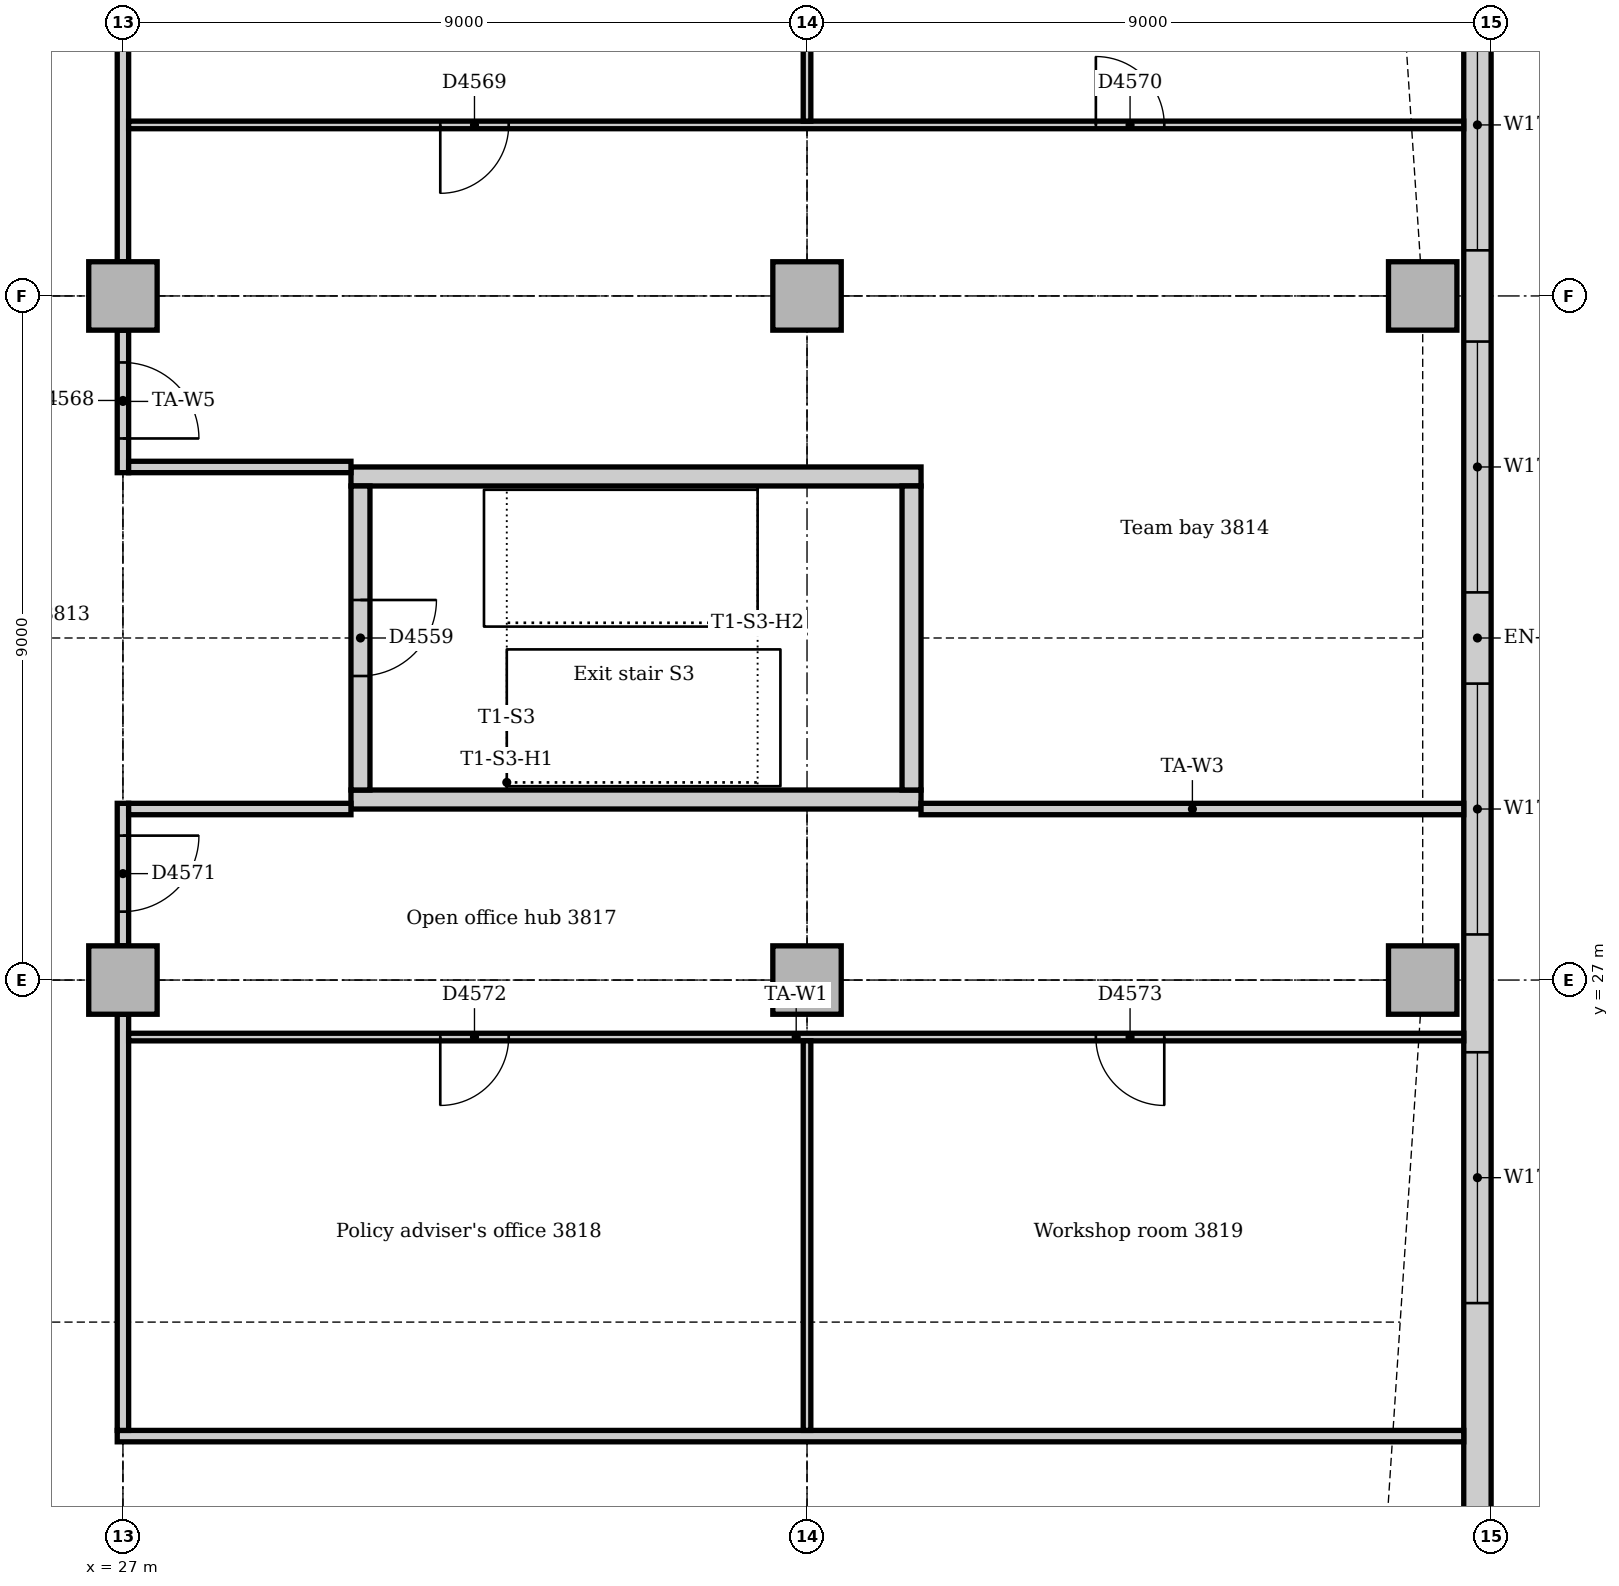
"""IFC4 building model, lengths in metres.
Left out: names, types, materials, properties, quantities, classifications, styles, units other than length and angle.
Written with IfcOpenShell. Run it as: python <this file> out.ifc"""

import sys

from ifc_helpers import new_model, si_unit, direction, frame, frame_2d, origin, origin_2d, place, context, subcontext, project, spatial, rectangle, extrude, element, fill, save


model = new_model("IFC4")
c1 = context("Model", 3, precision=1e-05, world=origin(), true_north=direction((0.0, 1.0)))
c2 = subcontext(c1, "Body", "Model", "MODEL_VIEW")
j1 = project(units=[si_unit("LENGTHUNIT", "METRE"), si_unit("PLANEANGLEUNIT", "RADIAN")], contexts=[c1])
p1 = place(None, origin())
s1 = spatial("IfcSite", under=j1, at=p1, CompositionType="ELEMENT")
p2 = place(p1, origin())
s2 = spatial("IfcBuilding", under=s1, at=p2, CompositionType="ELEMENT")
p3 = place(p2, frame((0.0, 0.0, 161.0)))
s3 = spatial("IfcBuildingStorey", under=s2, at=p3, CompositionType="ELEMENT", Elevation=161.0)
for number, where, z_axis, x_axis in (
    (1, (30.0, 29.375, 0.0), (0.0, 0.0, 1.0), (1.0, 0.0, 0.0)),
    (2, (37.5, 33.625, 0.0), (0.0, 0.0, 1.0), (-1.0, 0.0, 0.0)),
):
    element("IfcWall", number, at=place(p3, frame(where, z_axis=z_axis, x_axis=x_axis)), inside=s3, PredefinedType="SOLIDWALL", context=c2, shape_type="SweptSolid", body=[
        extrude(rectangle(XDim=7.5, YDim=0.25, at=frame_2d((3.75, 0.0))), origin(), (0.0, 0.0, 1.0), 4.0),
    ])
p4 = place(p3, frame((37.375, 29.5, 0.0), z_axis=(0.0, 0.0, 1.0), x_axis=(0.0, 1.0, 0.0)))
e3 = element("IfcWall", 3, at=p4, inside=s3, PredefinedType="SOLIDWALL", context=c2, shape_type="SweptSolid", body=[
    extrude(rectangle(XDim=4.0, YDim=0.25, at=frame_2d((2.0, 0.0))), origin(), (0.0, 0.0, 1.0), 4.0),
])
p5 = place(p3, frame((30.125, 33.5, 0.0), z_axis=(0.0, 0.0, 1.0), x_axis=(0.0, -1.0, 0.0)))
e4 = element("IfcWall", 4, at=p5, inside=s3, PredefinedType="SOLIDWALL", context=c2, shape_type="SweptSolid", body=[
    extrude(rectangle(XDim=4.0, YDim=0.25, at=frame_2d((2.0, 0.0))), origin(), (0.0, 0.0, 1.0), 4.0),
])
p6 = place(p5, frame((1.5, 0.0, 0.0)))
e5 = element("IfcOpeningElement", 5, at=p6, cuts=e4, PredefinedType="OPENING", context=c2, shape_type="SweptSolid", body=[
    extrude(rectangle(XDim=1.0, YDim=2.1, at=frame_2d((0.5, 1.05))), frame((0.0, 0.135, 0.0), z_axis=(0.0, -1.0, 0.0), x_axis=(1.0, 0.0, 0.0)), (0.0, 0.0, 1.0), 0.27),
])
for number, where, z_axis, x_axis in (
    (6, (44.1, 27.0, 0.0), (0.0, 0.0, 1.0), (1.0, 0.0, 0.0)),
    (7, (44.1, 36.0, 0.0), (0.0, 0.0, 1.0), (1.0, 0.0, 0.0)),
    (8, (27.0, 27.0, 0.0), (0.0, 0.0, 1.0), (1.0, 0.0, 0.0)),
    (9, (27.0, 36.0, 0.0), (0.0, 0.0, 1.0), (1.0, 0.0, 0.0)),
    (10, (36.0, 27.0, 0.0), (0.0, 0.0, 1.0), (1.0, 0.0, 0.0)),
    (11, (36.0, 36.0, 0.0), (0.0, 0.0, 1.0), (1.0, 0.0, 0.0)),
):
    element("IfcColumn", number, at=place(p3, frame(where, z_axis=z_axis, x_axis=x_axis)), inside=s3, PredefinedType="COLUMN", context=c2, shape_type="SweptSolid", body=[
        extrude(rectangle(XDim=0.9, YDim=0.9, at=origin_2d()), origin(), (0.0, 0.0, 1.0), 3.85),
    ])
p7 = place(p3, frame((44.82, 19.243, 0.0), z_axis=(0.0, 0.0, 1.0), x_axis=(0.0, 1.0, 0.0)))
e12 = element("IfcWall", 12, at=p7, inside=s3, PredefinedType="STANDARD", context=c2, shape_type="SweptSolid", body=[
    extrude(rectangle(XDim=24.515, YDim=0.36, at=frame_2d((12.257, 0.0))), origin(), (0.0, 0.0, 1.0), 3.85),
])
p8 = place(p7, frame((3.507, 0.0, 0.9)))
e13 = element("IfcOpeningElement", 13, at=p8, cuts=e12, PredefinedType="OPENING", context=c2, shape_type="SweptSolid", body=[
    extrude(rectangle(XDim=3.3, YDim=1.6, at=frame_2d((1.65, 0.8))), frame((0.0, 0.19, 0.0), z_axis=(0.0, -1.0, 0.0), x_axis=(1.0, 0.0, 0.0)), (0.0, 0.0, 1.0), 0.38),
])
p9 = place(p7, frame((8.357, 0.0, 0.9)))
e14 = element("IfcOpeningElement", 14, at=p9, cuts=e12, PredefinedType="OPENING", context=c2, shape_type="SweptSolid", body=[
    extrude(rectangle(XDim=3.3, YDim=1.6, at=frame_2d((1.65, 0.8))), frame((0.0, 0.19, 0.0), z_axis=(0.0, -1.0, 0.0), x_axis=(1.0, 0.0, 0.0)), (0.0, 0.0, 1.0), 0.38),
])
p10 = place(p7, frame((12.857, 0.0, 0.9)))
e15 = element("IfcOpeningElement", 15, at=p10, cuts=e12, PredefinedType="OPENING", context=c2, shape_type="SweptSolid", body=[
    extrude(rectangle(XDim=3.3, YDim=1.6, at=frame_2d((1.65, 0.8))), frame((0.0, 0.19, 0.0), z_axis=(0.0, -1.0, 0.0), x_axis=(1.0, 0.0, 0.0)), (0.0, 0.0, 1.0), 0.38),
])
p11 = place(p7, frame((17.357, 0.0, 0.9)))
e16 = element("IfcOpeningElement", 16, at=p11, cuts=e12, PredefinedType="OPENING", context=c2, shape_type="SweptSolid", body=[
    extrude(rectangle(XDim=3.3, YDim=1.6, at=frame_2d((1.65, 0.8))), frame((0.0, 0.19, 0.0), z_axis=(0.0, -1.0, 0.0), x_axis=(1.0, 0.0, 0.0)), (0.0, 0.0, 1.0), 0.38),
])
p12 = place(p3, frame((26.925, 21.0, 0.0), z_axis=(0.0, 0.0, 1.0), x_axis=(1.0, 0.0, 0.0)))
e17 = element("IfcWall", 17, at=p12, inside=s3, PredefinedType="PARTITIONING", context=c2, shape_type="SweptSolid", body=[
    extrude(rectangle(XDim=17.715, YDim=0.15, at=frame_2d((8.857, 0.0))), origin(), (0.0, 0.0, 1.0), 3.85),
])
p13 = place(p3, frame((27.0, 33.675, 0.0), z_axis=(0.0, 0.0, 1.0), x_axis=(0.0, 1.0, 0.0)))
e18 = element("IfcWall", 18, at=p13, inside=s3, PredefinedType="PARTITIONING", context=c2, shape_type="SweptSolid", body=[
    extrude(rectangle(XDim=1.875, YDim=0.15, at=frame_2d((0.938, 0.0))), origin(), (0.0, 0.0, 1.0), 3.362),
])
p14 = place(p13, frame((0.45, 0.0, 0.0)))
e19 = element("IfcOpeningElement", 19, at=p14, cuts=e18, PredefinedType="OPENING", context=c2, shape_type="SweptSolid", body=[
    extrude(rectangle(XDim=1.0, YDim=2.1, at=frame_2d((0.5, 1.05))), frame((0.0, 0.085, 0.0), z_axis=(0.0, -1.0, 0.0), x_axis=(1.0, 0.0, 0.0)), (0.0, 0.0, 1.0), 0.17),
])
p15 = place(p3, frame((27.0, 36.45, 0.0), z_axis=(0.0, 0.0, 1.0), x_axis=(0.0, 1.0, 0.0)))
e20 = element("IfcWall", 20, at=p15, inside=s3, PredefinedType="PARTITIONING", context=c2, shape_type="SweptSolid", body=[
    extrude(rectangle(XDim=7.2, YDim=0.15, at=frame_2d((3.6, 0.0))), origin(), (0.0, 0.0, 1.0), 3.362),
])
p16 = place(p3, frame((27.0, 21.075, 0.0), z_axis=(0.0, 0.0, 1.0), x_axis=(0.0, 1.0, 0.0)))
e21 = element("IfcWall", 21, at=p16, inside=s3, PredefinedType="PARTITIONING", context=c2, shape_type="SweptSolid", body=[
    extrude(rectangle(XDim=5.475, YDim=0.15, at=frame_2d((2.737, 0.0))), origin(), (0.0, 0.0, 1.0), 3.362),
])
p17 = place(p3, frame((27.0, 27.45, 0.0), z_axis=(0.0, 0.0, 1.0), x_axis=(0.0, 1.0, 0.0)))
e22 = element("IfcWall", 22, at=p17, inside=s3, PredefinedType="PARTITIONING", context=c2, shape_type="SweptSolid", body=[
    extrude(rectangle(XDim=1.875, YDim=0.15, at=frame_2d((0.938, 0.0))), origin(), (0.0, 0.0, 1.0), 3.362),
])
p18 = place(p17, frame((0.45, 0.0, 0.0)))
e23 = element("IfcOpeningElement", 23, at=p18, cuts=e22, PredefinedType="OPENING", context=c2, shape_type="SweptSolid", body=[
    extrude(rectangle(XDim=1.0, YDim=2.1, at=frame_2d((0.5, 1.05))), frame((0.0, 0.085, 0.0), z_axis=(0.0, -1.0, 0.0), x_axis=(1.0, 0.0, 0.0)), (0.0, 0.0, 1.0), 0.17),
])
for number, where, z_axis, x_axis in (
    (24, (27.075, 29.25, 0.0), (0.0, 0.0, 1.0), (1.0, 0.0, 0.0)),
    (25, (27.075, 33.75, 0.0), (0.0, 0.0, 1.0), (1.0, 0.0, 0.0)),
):
    element("IfcWall", number, at=place(p3, frame(where, z_axis=z_axis, x_axis=x_axis)), inside=s3, PredefinedType="PARTITIONING", context=c2, shape_type="SweptSolid", body=[
        extrude(rectangle(XDim=2.925, YDim=0.15, at=frame_2d((1.462, 0.0))), origin(), (0.0, 0.0, 1.0), 3.85),
    ])
p19 = place(p3, frame((37.5, 29.25, 0.0), z_axis=(0.0, 0.0, 1.0), x_axis=(1.0, 0.0, 0.0)))
e26 = element("IfcWall", 26, at=p19, inside=s3, PredefinedType="PARTITIONING", context=c2, shape_type="SweptSolid", body=[
    extrude(rectangle(XDim=7.14, YDim=0.15, at=frame_2d((3.57, 0.0))), origin(), (0.0, 0.0, 1.0), 3.85),
])
p20 = place(p3, frame((27.075, 26.25, 0.0), z_axis=(0.0, 0.0, 1.0), x_axis=(1.0, 0.0, 0.0)))
e27 = element("IfcWall", 27, at=p20, inside=s3, PredefinedType="PARTITIONING", context=c2, shape_type="SweptSolid", body=[
    extrude(rectangle(XDim=17.565, YDim=0.1, at=frame_2d((8.783, 0.0))), origin(), (0.0, 0.0, 1.0), 3.85),
])
p21 = place(p20, frame((4.1, 0.0, 0.0)))
e28 = element("IfcOpeningElement", 28, at=p21, cuts=e27, PredefinedType="OPENING", context=c2, shape_type="SweptSolid", body=[
    extrude(rectangle(XDim=0.9, YDim=2.1, at=frame_2d((0.45, 1.05))), frame((0.0, 0.06, 0.0), z_axis=(0.0, -1.0, 0.0), x_axis=(1.0, 0.0, 0.0)), (0.0, 0.0, 1.0), 0.12),
])
p22 = place(p20, frame((12.725, 0.0, 0.0)))
e29 = element("IfcOpeningElement", 29, at=p22, cuts=e27, PredefinedType="OPENING", context=c2, shape_type="SweptSolid", body=[
    extrude(rectangle(XDim=0.9, YDim=2.1, at=frame_2d((0.45, 1.05))), frame((0.0, 0.06, 0.0), z_axis=(0.0, -1.0, 0.0), x_axis=(1.0, 0.0, 0.0)), (0.0, 0.0, 1.0), 0.12),
])
p23 = place(p3, frame((27.075, 38.25, 0.0), z_axis=(0.0, 0.0, 1.0), x_axis=(1.0, 0.0, 0.0)))
e30 = element("IfcWall", 30, at=p23, inside=s3, PredefinedType="PARTITIONING", context=c2, shape_type="SweptSolid", body=[
    extrude(rectangle(XDim=17.565, YDim=0.1, at=frame_2d((8.783, 0.0))), origin(), (0.0, 0.0, 1.0), 3.85),
])
p24 = place(p23, frame((4.1, 0.0, 0.0)))
e31 = element("IfcOpeningElement", 31, at=p24, cuts=e30, PredefinedType="OPENING", context=c2, shape_type="SweptSolid", body=[
    extrude(rectangle(XDim=0.9, YDim=2.1, at=frame_2d((0.45, 1.05))), frame((0.0, 0.06, 0.0), z_axis=(0.0, -1.0, 0.0), x_axis=(1.0, 0.0, 0.0)), (0.0, 0.0, 1.0), 0.12),
])
p25 = place(p23, frame((12.725, 0.0, 0.0)))
e32 = element("IfcOpeningElement", 32, at=p25, cuts=e30, PredefinedType="OPENING", context=c2, shape_type="SweptSolid", body=[
    extrude(rectangle(XDim=0.9, YDim=2.1, at=frame_2d((0.45, 1.05))), frame((0.0, 0.06, 0.0), z_axis=(0.0, -1.0, 0.0), x_axis=(1.0, 0.0, 0.0)), (0.0, 0.0, 1.0), 0.12),
])
p26 = place(p3, frame((36.0, 38.3, 0.0), z_axis=(0.0, 0.0, 1.0), x_axis=(0.0, 1.0, 0.0)))
e33 = element("IfcWall", 33, at=p26, inside=s3, PredefinedType="PARTITIONING", context=c2, shape_type="SweptSolid", body=[
    extrude(rectangle(XDim=5.35, YDim=0.1, at=frame_2d((2.675, 0.0))), origin(), (0.0, 0.0, 1.0), 3.362),
])
p27 = place(p3, frame((36.0, 21.075, 0.0), z_axis=(0.0, 0.0, 1.0), x_axis=(0.0, 1.0, 0.0)))
e34 = element("IfcWall", 34, at=p27, inside=s3, PredefinedType="PARTITIONING", context=c2, shape_type="SweptSolid", body=[
    extrude(rectangle(XDim=5.125, YDim=0.1, at=frame_2d((2.562, 0.0))), origin(), (0.0, 0.0, 1.0), 3.362),
])
p28 = place(p8, origin())
e35 = element("IfcWindow", 35, at=p28, inside=s3, PartitioningType="SINGLE_PANEL", PredefinedType="WINDOW", context=c2, shape_type="SweptSolid", body=[
    extrude(rectangle(XDim=3.3, YDim=1.6, at=frame_2d((1.65, 0.8))), frame((0.0, 0.13, 0.0), z_axis=(0.0, -1.0, 0.0), x_axis=(1.0, 0.0, 0.0)), (0.0, 0.0, 1.0), 0.06),
])
fill(e13, e35)
p29 = place(p9, origin())
e36 = element("IfcWindow", 36, at=p29, inside=s3, PartitioningType="SINGLE_PANEL", PredefinedType="WINDOW", context=c2, shape_type="SweptSolid", body=[
    extrude(rectangle(XDim=3.3, YDim=1.6, at=frame_2d((1.65, 0.8))), frame((0.0, 0.13, 0.0), z_axis=(0.0, -1.0, 0.0), x_axis=(1.0, 0.0, 0.0)), (0.0, 0.0, 1.0), 0.06),
])
fill(e14, e36)
p30 = place(p10, origin())
e37 = element("IfcWindow", 37, at=p30, inside=s3, PartitioningType="SINGLE_PANEL", PredefinedType="WINDOW", context=c2, shape_type="SweptSolid", body=[
    extrude(rectangle(XDim=3.3, YDim=1.6, at=frame_2d((1.65, 0.8))), frame((0.0, 0.13, 0.0), z_axis=(0.0, -1.0, 0.0), x_axis=(1.0, 0.0, 0.0)), (0.0, 0.0, 1.0), 0.06),
])
fill(e15, e37)
p31 = place(p11, origin())
e38 = element("IfcWindow", 38, at=p31, inside=s3, PartitioningType="SINGLE_PANEL", PredefinedType="WINDOW", context=c2, shape_type="SweptSolid", body=[
    extrude(rectangle(XDim=3.3, YDim=1.6, at=frame_2d((1.65, 0.8))), frame((0.0, 0.13, 0.0), z_axis=(0.0, -1.0, 0.0), x_axis=(1.0, 0.0, 0.0)), (0.0, 0.0, 1.0), 0.06),
])
fill(e16, e38)
p32 = place(p6, origin())
e39 = element("IfcDoor", 39, at=p32, inside=s3, OperationType="SINGLE_SWING_LEFT", PredefinedType="DOOR", context=c2, shape_type="SweptSolid", body=[
    extrude(rectangle(XDim=1.0, YDim=2.1, at=frame_2d((0.5, 1.05))), frame((0.0, 0.025, 0.0), z_axis=(0.0, -1.0, 0.0), x_axis=(1.0, 0.0, 0.0)), (0.0, 0.0, 1.0), 0.05),
])
fill(e5, e39)
p33 = place(p14, frame((1.0, 0.0, 0.0), z_axis=(0.0, 0.0, 1.0), x_axis=(-1.0, 0.0, 0.0)))
e40 = element("IfcDoor", 40, at=p33, inside=s3, OperationType="SINGLE_SWING_RIGHT", PredefinedType="DOOR", context=c2, shape_type="SweptSolid", body=[
    extrude(rectangle(XDim=1.0, YDim=2.1, at=frame_2d((0.5, 1.05))), frame((0.0, 0.025, 0.0), z_axis=(0.0, -1.0, 0.0), x_axis=(1.0, 0.0, 0.0)), (0.0, 0.0, 1.0), 0.05),
])
fill(e19, e40)
p34 = place(p24, frame((0.9, 0.0, 0.0), z_axis=(0.0, 0.0, 1.0), x_axis=(-1.0, 0.0, 0.0)))
e41 = element("IfcDoor", 41, at=p34, inside=s3, OperationType="SINGLE_SWING_RIGHT", PredefinedType="DOOR", context=c2, shape_type="SweptSolid", body=[
    extrude(rectangle(XDim=0.9, YDim=2.1, at=frame_2d((0.45, 1.05))), frame((0.0, 0.025, 0.0), z_axis=(0.0, -1.0, 0.0), x_axis=(1.0, 0.0, 0.0)), (0.0, 0.0, 1.0), 0.05),
])
fill(e31, e41)
p35 = place(p25, origin())
e42 = element("IfcDoor", 42, at=p35, inside=s3, OperationType="SINGLE_SWING_LEFT", PredefinedType="DOOR", context=c2, shape_type="SweptSolid", body=[
    extrude(rectangle(XDim=0.9, YDim=2.1, at=frame_2d((0.45, 1.05))), frame((0.0, 0.025, 0.0), z_axis=(0.0, -1.0, 0.0), x_axis=(1.0, 0.0, 0.0)), (0.0, 0.0, 1.0), 0.05),
])
fill(e32, e42)
p36 = place(p18, frame((1.0, 0.0, 0.0), z_axis=(0.0, 0.0, 1.0), x_axis=(-1.0, 0.0, 0.0)))
e43 = element("IfcDoor", 43, at=p36, inside=s3, OperationType="SINGLE_SWING_LEFT", PredefinedType="DOOR", context=c2, shape_type="SweptSolid", body=[
    extrude(rectangle(XDim=1.0, YDim=2.1, at=frame_2d((0.5, 1.05))), frame((0.0, 0.025, 0.0), z_axis=(0.0, -1.0, 0.0), x_axis=(1.0, 0.0, 0.0)), (0.0, 0.0, 1.0), 0.05),
])
fill(e23, e43)
p37 = place(p21, frame((0.9, 0.0, 0.0), z_axis=(0.0, 0.0, 1.0), x_axis=(-1.0, 0.0, 0.0)))
e44 = element("IfcDoor", 44, at=p37, inside=s3, OperationType="SINGLE_SWING_RIGHT", PredefinedType="DOOR", context=c2, shape_type="SweptSolid", body=[
    extrude(rectangle(XDim=0.9, YDim=2.1, at=frame_2d((0.45, 1.05))), frame((0.0, 0.025, 0.0), z_axis=(0.0, -1.0, 0.0), x_axis=(1.0, 0.0, 0.0)), (0.0, 0.0, 1.0), 0.05),
])
fill(e28, e44)
p38 = place(p22, frame((0.9, 0.0, 0.0), z_axis=(0.0, 0.0, 1.0), x_axis=(-1.0, 0.0, 0.0)))
e45 = element("IfcDoor", 45, at=p38, inside=s3, OperationType="SINGLE_SWING_LEFT", PredefinedType="DOOR", context=c2, shape_type="SweptSolid", body=[
    extrude(rectangle(XDim=0.9, YDim=2.1, at=frame_2d((0.45, 1.05))), frame((0.0, 0.025, 0.0), z_axis=(0.0, -1.0, 0.0), x_axis=(1.0, 0.0, 0.0)), (0.0, 0.0, 1.0), 0.05),
])
fill(e29, e45)
save(model, sys.argv[1])
